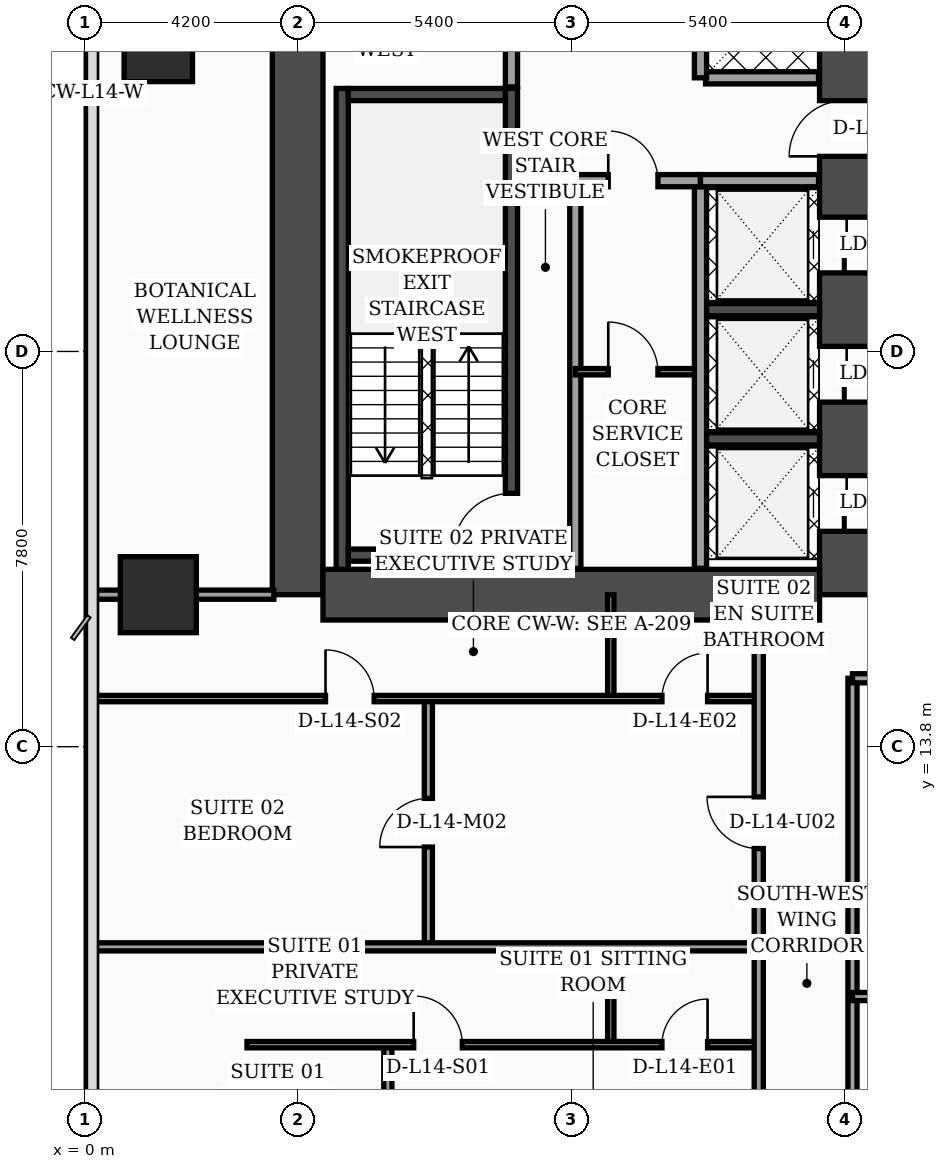
"""IFC4 building model, lengths in metres.
Left out: names, types, materials, properties, quantities, classifications, styles, units other than length and angle.
Written with IfcOpenShell. Run it as: python <this file> out.ifc"""

import sys

from ifc_helpers import new_model, si_unit, direction, frame, frame_2d, origin, origin_2d, place, context, subcontext, project, spatial, rectangle, extrude, element, fill, save


model = new_model("IFC4")
c1 = context("Model", 3, precision=1e-05, world=origin(), true_north=direction((0.0, 1.0)))
c2 = subcontext(c1, "Body", "Model", "MODEL_VIEW")
j1 = project(units=[si_unit("LENGTHUNIT", "METRE"), si_unit("PLANEANGLEUNIT", "RADIAN")], contexts=[c1])
p1 = place(None, origin())
s1 = spatial("IfcSite", under=j1, at=p1, CompositionType="ELEMENT")
p2 = place(p1, origin())
s2 = spatial("IfcBuilding", under=s1, at=p2, CompositionType="ELEMENT")
p3 = place(p2, frame((0.0, 0.0, 62.2)))
s3 = spatial("IfcBuildingStorey", under=s2, at=p3, CompositionType="ELEMENT", Elevation=62.2)
p4 = place(p3, frame((4.2, 16.8, 0.0), z_axis=(0.0, 0.0, 1.0), x_axis=(0.0, 1.0, 0.0)))
e1 = element("IfcWall", 1, at=p4, inside=s3, PredefinedType="SHEAR", context=c2, shape_type="SweptSolid", body=[
    extrude(rectangle(XDim=21.6, YDim=1.0, at=frame_2d((10.8, 0.0))), origin(), (0.0, 0.0, 1.0), 3.56),
])
p5 = place(p3, frame((15.0, 16.8, 0.0), z_axis=(0.0, 0.0, 1.0), x_axis=(0.0, 1.0, 0.0)))
e2 = element("IfcWall", 2, at=p5, inside=s3, PredefinedType="SHEAR", context=c2, shape_type="SweptSolid", body=[
    extrude(rectangle(XDim=21.6, YDim=1.0, at=frame_2d((10.8, 0.0))), origin(), (0.0, 0.0, 1.0), 3.56),
])
p6 = place(p5, frame((8.65, 0.0, 0.0)))
e3 = element("IfcOpeningElement", 3, at=p6, cuts=e2, PredefinedType="OPENING", context=c2, shape_type="SweptSolid", body=[
    extrude(rectangle(XDim=1.1, YDim=2.2, at=frame_2d((0.55, 1.1))), frame((0.0, 0.51, 0.0), z_axis=(0.0, -1.0, 0.0), x_axis=(1.0, 0.0, 0.0)), (0.0, 0.0, 1.0), 1.02),
])
p7 = place(p5, frame((1.25, 0.0, 0.0)))
e4 = element("IfcOpeningElement", 4, at=p7, cuts=e2, PredefinedType="OPENING", context=c2, shape_type="SweptSolid", body=[
    extrude(rectangle(XDim=1.1, YDim=2.2, at=frame_2d((0.55, 1.1))), frame((0.0, 0.51, 0.0), z_axis=(0.0, -1.0, 0.0), x_axis=(1.0, 0.0, 0.0)), (0.0, 0.0, 1.0), 1.02),
])
p8 = place(p5, frame((3.8, 0.0, 0.0)))
e5 = element("IfcOpeningElement", 5, at=p8, cuts=e2, PredefinedType="OPENING", context=c2, shape_type="SweptSolid", body=[
    extrude(rectangle(XDim=1.1, YDim=2.2, at=frame_2d((0.55, 1.1))), frame((0.0, 0.51, 0.0), z_axis=(0.0, -1.0, 0.0), x_axis=(1.0, 0.0, 0.0)), (0.0, 0.0, 1.0), 1.02),
])
p9 = place(p5, frame((6.35, 0.0, 0.0)))
e6 = element("IfcOpeningElement", 6, at=p9, cuts=e2, PredefinedType="OPENING", context=c2, shape_type="SweptSolid", body=[
    extrude(rectangle(XDim=1.1, YDim=2.2, at=frame_2d((0.55, 1.1))), frame((0.0, 0.51, 0.0), z_axis=(0.0, -1.0, 0.0), x_axis=(1.0, 0.0, 0.0)), (0.0, 0.0, 1.0), 1.02),
])
p10 = place(p3, frame((4.7, 16.8, 0.0), z_axis=(0.0, 0.0, 1.0), x_axis=(1.0, 0.0, 0.0)))
e7 = element("IfcWall", 7, at=p10, inside=s3, PredefinedType="SHEAR", context=c2, shape_type="SweptSolid", body=[
    extrude(rectangle(XDim=9.8, YDim=1.0, at=frame_2d((4.9, 0.0))), origin(), (0.0, 0.0, 1.0), 3.56),
])
p11 = place(p3, frame((5.08, 17.3, 0.0), z_axis=(0.0, 0.0, 1.0), x_axis=(0.0, 1.0, 0.0)))
e8 = element("IfcWall", 8, at=p11, inside=s3, PredefinedType="SOLIDWALL", context=c2, shape_type="SweptSolid", body=[
    extrude(rectangle(XDim=9.49, YDim=0.24, at=frame_2d((4.745, 0.0))), origin(), (0.0, 0.0, 1.0), 3.56),
])
p12 = place(p3, frame((8.42, 17.3, 0.0), z_axis=(0.0, 0.0, 1.0), x_axis=(0.0, 1.0, 0.0)))
e9 = element("IfcWall", 9, at=p12, inside=s3, PredefinedType="SOLIDWALL", context=c2, shape_type="SweptSolid", body=[
    extrude(rectangle(XDim=9.49, YDim=0.24, at=frame_2d((4.745, 0.0))), origin(), (0.0, 0.0, 1.0), 3.56),
])
p13 = place(p12, frame((0.35, 0.0, 0.0)))
e10 = element("IfcOpeningElement", 10, at=p13, cuts=e9, PredefinedType="OPENING", context=c2, shape_type="SweptSolid", body=[
    extrude(rectangle(XDim=1.15, YDim=2.2, at=frame_2d((0.575, 1.1))), frame((0.0, 0.13, 0.0), z_axis=(0.0, -1.0, 0.0), x_axis=(1.0, 0.0, 0.0)), (0.0, 0.0, 1.0), 0.26),
])
for number, where, z_axis, x_axis in (
    (11, (5.2, 17.58, 0.0), (0.0, 0.0, 1.0), (1.0, 0.0, 0.0)),
    (12, (5.2, 26.67, 0.0), (0.0, 0.0, 1.0), (1.0, 0.0, 0.0)),
):
    element("IfcWall", number, at=place(p3, frame(where, z_axis=z_axis, x_axis=x_axis)), inside=s3, PredefinedType="SOLIDWALL", context=c2, shape_type="SweptSolid", body=[
        extrude(rectangle(XDim=3.1, YDim=0.24, at=frame_2d((1.55, 0.0))), origin(), (0.0, 0.0, 1.0), 3.56),
    ])
for number, where, z_axis, x_axis in (
    (13, (12.18, 19.875, 0.0), (0.0, 0.0, 1.0), (1.0, 0.0, 0.0)),
    (14, (12.18, 22.425, 0.0), (0.0, 0.0, 1.0), (1.0, 0.0, 0.0)),
):
    element("IfcWall", number, at=place(p3, frame(where, z_axis=z_axis, x_axis=x_axis)), inside=s3, PredefinedType="SOLIDWALL", context=c2, shape_type="SweptSolid", body=[
        extrude(rectangle(XDim=2.32, YDim=0.24, at=frame_2d((1.16, 0.0))), origin(), (0.0, 0.0, 1.0), 3.56),
    ])
p14 = place(p3, frame((1.45, 16.8, 0.0), z_axis=(0.0, 0.0, 1.0), x_axis=(1.0, 0.0, 0.0)))
e15 = element("IfcColumn", 15, at=p14, inside=s3, PredefinedType="COLUMN", context=c2, shape_type="SweptSolid", body=[
    extrude(rectangle(XDim=1.5, YDim=1.5, at=origin_2d()), origin(), (0.0, 0.0, 1.0), 3.56),
])
p15 = place(p3, frame((1.45, 27.6, 0.0), z_axis=(0.0, 0.0, 1.0), x_axis=(1.0, 0.0, 0.0)))
e16 = element("IfcColumn", 16, at=p15, inside=s3, PredefinedType="COLUMN", context=c2, shape_type="SweptSolid", body=[
    extrude(rectangle(XDim=1.35, YDim=1.35, at=origin_2d()), origin(), (0.0, 0.0, 1.0), 3.56),
])
p16 = place(p3, frame((8.42, 26.82, 0.0), z_axis=(0.0, 0.0, 1.0), x_axis=(0.0, 1.0, 0.0)))
e17 = element("IfcWall", 17, at=p16, inside=s3, PredefinedType="SOLIDWALL", context=c2, shape_type="SweptSolid", body=[
    extrude(rectangle(XDim=3.0, YDim=0.24, at=frame_2d((1.5, 0.0))), origin(), (0.0, 0.0, 1.0), 3.56),
])
p17 = place(p16, frame((0.9, 0.0, 0.0)))
e18 = element("IfcOpeningElement", 18, at=p17, cuts=e17, PredefinedType="OPENING", context=c2, shape_type="SweptSolid", body=[
    extrude(rectangle(XDim=1.1, YDim=2.2, at=frame_2d((0.55, 1.1))), frame((0.0, 0.13, 0.0), z_axis=(0.0, -1.0, 0.0), x_axis=(1.0, 0.0, 0.0)), (0.0, 0.0, 1.0), 0.26),
])
p18 = place(p3, frame((9.68, 17.32, 0.0), z_axis=(0.0, 0.0, 1.0), x_axis=(0.0, 1.0, 0.0)))
e19 = element("IfcWall", 19, at=p18, inside=s3, PredefinedType="SOLIDWALL", context=c2, shape_type="SweptSolid", body=[
    extrude(rectangle(XDim=7.68, YDim=0.22, at=frame_2d((3.84, 0.0))), origin(), (0.0, 0.0, 1.0), 3.56),
])
p19 = place(p3, frame((9.68, 21.2, 0.0), z_axis=(0.0, 0.0, 1.0), x_axis=(1.0, 0.0, 0.0)))
e20 = element("IfcWall", 20, at=p19, inside=s3, PredefinedType="PARTITIONING", context=c2, shape_type="SweptSolid", body=[
    extrude(rectangle(XDim=2.47, YDim=0.125, at=frame_2d((1.235, 0.0))), origin(), (0.0, 0.0, 1.0), 3.56),
])
p20 = place(p19, frame((0.65, 0.0, 0.0)))
e21 = element("IfcOpeningElement", 21, at=p20, cuts=e20, PredefinedType="OPENING", context=c2, shape_type="SweptSolid", body=[
    extrude(rectangle(XDim=0.98, YDim=2.15, at=frame_2d((0.49, 1.075))), frame((0.0, 0.073, 0.0), z_axis=(0.0, -1.0, 0.0), x_axis=(1.0, 0.0, 0.0)), (0.0, 0.0, 1.0), 0.145),
])
p21 = place(p3, frame((12.15, 17.32, 0.0), z_axis=(0.0, 0.0, 1.0), x_axis=(0.0, 1.0, 0.0)))
e22 = element("IfcWall", 22, at=p21, inside=s3, PredefinedType="SOLIDWALL", context=c2, shape_type="SweptSolid", body=[
    extrude(rectangle(XDim=7.65, YDim=0.24, at=frame_2d((3.825, 0.0))), origin(), (0.0, 0.0, 1.0), 3.56),
])
p22 = place(p3, frame((9.68, 24.97, 0.0), z_axis=(0.0, 0.0, 1.0), x_axis=(1.0, 0.0, 0.0)))
e23 = element("IfcWall", 23, at=p22, inside=s3, PredefinedType="SOLIDWALL", context=c2, shape_type="SweptSolid", body=[
    extrude(rectangle(XDim=2.47, YDim=0.24, at=frame_2d((1.235, 0.0))), origin(), (0.0, 0.0, 1.0), 3.56),
])
p23 = place(p22, frame((0.65, 0.0, 0.0)))
e24 = element("IfcOpeningElement", 24, at=p23, cuts=e23, PredefinedType="OPENING", context=c2, shape_type="SweptSolid", body=[
    extrude(rectangle(XDim=0.98, YDim=2.15, at=frame_2d((0.49, 1.075))), frame((0.0, 0.13, 0.0), z_axis=(0.0, -1.0, 0.0), x_axis=(1.0, 0.0, 0.0)), (0.0, 0.0, 1.0), 0.26),
])
p24 = place(p3, frame((12.15, 24.97, 0.0), z_axis=(0.0, 0.0, 1.0), x_axis=(1.0, 0.0, 0.0)))
e25 = element("IfcWall", 25, at=p24, inside=s3, PredefinedType="SOLIDWALL", context=c2, shape_type="SweptSolid", body=[
    extrude(rectangle(XDim=2.33, YDim=0.24, at=frame_2d((1.165, 0.0))), origin(), (0.0, 0.0, 1.0), 2.84),
])
p25 = place(p3, frame((12.25, 27.0, 0.0), z_axis=(0.0, 0.0, 1.0), x_axis=(1.0, 0.0, 0.0)))
e26 = element("IfcWall", 26, at=p25, inside=s3, PredefinedType="SOLIDWALL", context=c2, shape_type="SweptSolid", body=[
    extrude(rectangle(XDim=2.23, YDim=0.24, at=frame_2d((1.115, 0.0))), origin(), (0.0, 0.0, 1.0), 3.56),
])
p26 = place(p3, frame((12.15, 27.0, 0.0), z_axis=(0.0, 0.0, 1.0), x_axis=(0.0, 1.0, 0.0)))
e27 = element("IfcWall", 27, at=p26, inside=s3, PredefinedType="SOLIDWALL", context=c2, shape_type="SweptSolid", body=[
    extrude(rectangle(XDim=7.75, YDim=0.24, at=frame_2d((3.875, 0.0))), origin(), (0.0, 0.0, 1.0), 3.56),
])
p27 = place(p3, frame((0.08, 16.8, 0.0), z_axis=(0.0, 0.0, 1.0), x_axis=(1.0, 0.0, 0.0)))
e28 = element("IfcWall", 28, at=p27, inside=s3, PredefinedType="PARTITIONING", context=c2, shape_type="SweptSolid", body=[
    extrude(rectangle(XDim=3.65, YDim=0.18, at=frame_2d((1.825, 0.0))), origin(), (0.0, 0.0, 1.0), 2.84),
])
p28 = place(p3, frame((10.38, 7.92, 0.0), z_axis=(0.0, 0.0, 1.0), x_axis=(0.0, 1.0, 0.0)))
e29 = element("IfcWall", 29, at=p28, inside=s3, PredefinedType="PARTITIONING", context=c2, shape_type="SweptSolid", body=[
    extrude(rectangle(XDim=1.93, YDim=0.125, at=frame_2d((0.965, 0.0))), origin(), (0.0, 0.0, 1.0), 3.56),
])
p29 = place(p3, frame((5.98, 2.44, 0.0), z_axis=(0.0, 0.0, 1.0), x_axis=(0.0, 1.0, 0.0)))
e30 = element("IfcWall", 30, at=p29, inside=s3, PredefinedType="PARTITIONING", context=c2, shape_type="SweptSolid", body=[
    extrude(rectangle(XDim=5.48, YDim=0.16, at=frame_2d((2.74, 0.0))), origin(), (0.0, 0.0, 1.0), 3.04),
])
p30 = place(p29, frame((2.26, 0.0, 0.0)))
e31 = element("IfcOpeningElement", 31, at=p30, cuts=e30, PredefinedType="OPENING", context=c2, shape_type="SweptSolid", body=[
    extrude(rectangle(XDim=0.96, YDim=2.2, at=frame_2d((0.48, 1.1))), frame((0.0, 0.09, 0.0), z_axis=(0.0, -1.0, 0.0), x_axis=(1.0, 0.0, 0.0)), (0.0, 0.0, 1.0), 0.18),
])
p31 = place(p3, frame((3.2, 7.92, 0.0), z_axis=(0.0, 0.0, 1.0), x_axis=(1.0, 0.0, 0.0)))
e32 = element("IfcWall", 32, at=p31, inside=s3, PredefinedType="PARTITIONING", context=c2, shape_type="SweptSolid", body=[
    extrude(rectangle(XDim=10.1, YDim=0.125, at=frame_2d((5.05, 0.0))), origin(), (0.0, 0.0, 1.0), 2.84),
])
p32 = place(p31, frame((3.29, 0.0, 0.0)))
e33 = element("IfcOpeningElement", 33, at=p32, cuts=e32, PredefinedType="OPENING", context=c2, shape_type="SweptSolid", body=[
    extrude(rectangle(XDim=0.96, YDim=2.2, at=frame_2d((0.48, 1.1))), frame((0.0, 0.073, 0.0), z_axis=(0.0, -1.0, 0.0), x_axis=(1.0, 0.0, 0.0)), (0.0, 0.0, 1.0), 0.145),
])
p33 = place(p31, frame((8.19, 0.0, 0.0)))
e34 = element("IfcOpeningElement", 34, at=p33, cuts=e32, PredefinedType="OPENING", context=c2, shape_type="SweptSolid", body=[
    extrude(rectangle(XDim=0.9, YDim=2.15, at=frame_2d((0.45, 1.075))), frame((0.0, 0.073, 0.0), z_axis=(0.0, -1.0, 0.0), x_axis=(1.0, 0.0, 0.0)), (0.0, 0.0, 1.0), 0.145),
])
p34 = place(p3, frame((10.38, 14.75, 0.0), z_axis=(0.0, 0.0, 1.0), x_axis=(0.0, 1.0, 0.0)))
e35 = element("IfcWall", 35, at=p34, inside=s3, PredefinedType="PARTITIONING", context=c2, shape_type="SweptSolid", body=[
    extrude(rectangle(XDim=2.05, YDim=0.125, at=frame_2d((1.025, 0.0))), origin(), (0.0, 0.0, 1.0), 3.56),
])
p35 = place(p3, frame((6.78, 9.85, 0.0), z_axis=(0.0, 0.0, 1.0), x_axis=(0.0, 1.0, 0.0)))
e36 = element("IfcWall", 36, at=p35, inside=s3, PredefinedType="PARTITIONING", context=c2, shape_type="SweptSolid", body=[
    extrude(rectangle(XDim=4.9, YDim=0.16, at=frame_2d((2.45, 0.0))), origin(), (0.0, 0.0, 1.0), 3.14),
])
p36 = place(p35, frame((1.97, 0.0, 0.0)))
e37 = element("IfcOpeningElement", 37, at=p36, cuts=e36, PredefinedType="OPENING", context=c2, shape_type="SweptSolid", body=[
    extrude(rectangle(XDim=0.96, YDim=2.2, at=frame_2d((0.48, 1.1))), frame((0.0, 0.09, 0.0), z_axis=(0.0, -1.0, 0.0), x_axis=(1.0, 0.0, 0.0)), (0.0, 0.0, 1.0), 0.18),
])
p37 = place(p3, frame((0.08, 14.75, 0.0), z_axis=(0.0, 0.0, 1.0), x_axis=(1.0, 0.0, 0.0)))
e38 = element("IfcWall", 38, at=p37, inside=s3, PredefinedType="PARTITIONING", context=c2, shape_type="SweptSolid", body=[
    extrude(rectangle(XDim=13.22, YDim=0.125, at=frame_2d((6.61, 0.0))), origin(), (0.0, 0.0, 1.0), 2.84),
])
p38 = place(p37, frame((4.67, 0.0, 0.0)))
e39 = element("IfcOpeningElement", 39, at=p38, cuts=e38, PredefinedType="OPENING", context=c2, shape_type="SweptSolid", body=[
    extrude(rectangle(XDim=0.96, YDim=2.2, at=frame_2d((0.48, 1.1))), frame((0.0, 0.073, 0.0), z_axis=(0.0, -1.0, 0.0), x_axis=(1.0, 0.0, 0.0)), (0.0, 0.0, 1.0), 0.145),
])
p39 = place(p37, frame((11.31, 0.0, 0.0)))
e40 = element("IfcOpeningElement", 40, at=p39, cuts=e38, PredefinedType="OPENING", context=c2, shape_type="SweptSolid", body=[
    extrude(rectangle(XDim=0.9, YDim=2.15, at=frame_2d((0.45, 1.075))), frame((0.0, 0.073, 0.0), z_axis=(0.0, -1.0, 0.0), x_axis=(1.0, 0.0, 0.0)), (0.0, 0.0, 1.0), 0.145),
])
p40 = place(p3, frame((0.08, 9.85, 0.0), z_axis=(0.0, 0.0, 1.0), x_axis=(1.0, 0.0, 0.0)))
e41 = element("IfcWall", 41, at=p40, inside=s3, PredefinedType="PARTITIONING", context=c2, shape_type="SweptSolid", body=[
    extrude(rectangle(XDim=13.22, YDim=0.16, at=frame_2d((6.61, 0.0))), origin(), (0.0, 0.0, 1.0), 2.84),
])
p41 = place(p3, frame((13.3, 2.44, 0.0), z_axis=(0.0, 0.0, 1.0), x_axis=(0.0, 1.0, 0.0)))
e42 = element("IfcWall", 42, at=p41, inside=s3, PredefinedType="PARTITIONING", context=c2, shape_type="SweptSolid", body=[
    extrude(rectangle(XDim=14.36, YDim=0.18, at=frame_2d((7.18, 0.0))), origin(), (0.0, 0.0, 1.0), 3.04),
])
p42 = place(p41, frame((3.01, 0.0, 0.0)))
e43 = element("IfcOpeningElement", 43, at=p42, cuts=e42, PredefinedType="OPENING", context=c2, shape_type="SweptSolid", body=[
    extrude(rectangle(XDim=1.02, YDim=2.2, at=frame_2d((0.51, 1.1))), frame((0.0, 0.1, 0.0), z_axis=(0.0, -1.0, 0.0), x_axis=(1.0, 0.0, 0.0)), (0.0, 0.0, 1.0), 0.2),
])
p43 = place(p41, frame((9.35, 0.0, 0.0)))
e44 = element("IfcOpeningElement", 44, at=p43, cuts=e42, PredefinedType="OPENING", context=c2, shape_type="SweptSolid", body=[
    extrude(rectangle(XDim=1.02, YDim=2.2, at=frame_2d((0.51, 1.1))), frame((0.0, 0.1, 0.0), z_axis=(0.0, -1.0, 0.0), x_axis=(1.0, 0.0, 0.0)), (0.0, 0.0, 1.0), 0.2),
])
p44 = place(p3, frame((15.15, 2.44, 0.0), z_axis=(0.0, 0.0, 1.0), x_axis=(0.0, 1.0, 0.0)))
e45 = element("IfcWall", 45, at=p44, inside=s3, PredefinedType="PARTITIONING", context=c2, shape_type="SweptSolid", body=[
    extrude(rectangle(XDim=12.71, YDim=0.18, at=frame_2d((6.355, 0.0))), origin(), (0.0, 0.0, 1.0), 3.04),
])
p45 = place(p3, frame((15.15, 8.87, 0.0), z_axis=(0.0, 0.0, 1.0), x_axis=(1.0, 0.0, 0.0)))
e46 = element("IfcWall", 46, at=p45, inside=s3, PredefinedType="PARTITIONING", context=c2, shape_type="SweptSolid", body=[
    extrude(rectangle(XDim=4.45, YDim=0.16, at=frame_2d((2.225, 0.0))), origin(), (0.0, 0.0, 1.0), 3.56),
])
p46 = place(p45, frame((1.75, 0.0, 0.0)))
e47 = element("IfcOpeningElement", 47, at=p46, cuts=e46, PredefinedType="OPENING", context=c2, shape_type="SweptSolid", body=[
    extrude(rectangle(XDim=0.96, YDim=2.2, at=frame_2d((0.48, 1.1))), frame((0.0, 0.09, 0.0), z_axis=(0.0, -1.0, 0.0), x_axis=(1.0, 0.0, 0.0)), (0.0, 0.0, 1.0), 0.18),
])
p47 = place(p3, frame((15.15, 15.15, 0.0), z_axis=(0.0, 0.0, 1.0), x_axis=(1.0, 0.0, 0.0)))
e48 = element("IfcWall", 48, at=p47, inside=s3, PredefinedType="PARTITIONING", context=c2, shape_type="SweptSolid", body=[
    extrude(rectangle(XDim=6.45, YDim=0.18, at=frame_2d((3.225, 0.0))), origin(), (0.0, 0.0, 1.0), 2.34),
])
p48 = place(p47, frame((1.74, 0.0, 0.0)))
e49 = element("IfcOpeningElement", 49, at=p48, cuts=e48, PredefinedType="OPENING", context=c2, shape_type="SweptSolid", body=[
    extrude(rectangle(XDim=1.02, YDim=2.2, at=frame_2d((0.51, 1.1))), frame((0.0, 0.1, 0.0), z_axis=(0.0, -1.0, 0.0), x_axis=(1.0, 0.0, 0.0)), (0.0, 0.0, 1.0), 0.2),
])
p49 = place(p20, origin())
e50 = element("IfcDoor", 50, at=p49, inside=s3, OperationType="SINGLE_SWING_LEFT", PredefinedType="DOOR", context=c2, shape_type="SweptSolid", body=[
    extrude(rectangle(XDim=0.98, YDim=2.15, at=frame_2d((0.49, 1.075))), frame((0.0, 0.025, 0.0), z_axis=(0.0, -1.0, 0.0), x_axis=(1.0, 0.0, 0.0)), (0.0, 0.0, 1.0), 0.05),
])
fill(e21, e50)
p50 = place(p23, origin())
e51 = element("IfcDoor", 51, at=p50, inside=s3, OperationType="SINGLE_SWING_LEFT", PredefinedType="DOOR", context=c2, shape_type="SweptSolid", body=[
    extrude(rectangle(XDim=0.98, YDim=2.15, at=frame_2d((0.49, 1.075))), frame((0.0, 0.025, 0.0), z_axis=(0.0, -1.0, 0.0), x_axis=(1.0, 0.0, 0.0)), (0.0, 0.0, 1.0), 0.05),
])
fill(e24, e51)
p51 = place(p32, origin())
e52 = element("IfcDoor", 52, at=p51, inside=s3, OperationType="SINGLE_SWING_LEFT", PredefinedType="DOOR", context=c2, shape_type="SweptSolid", body=[
    extrude(rectangle(XDim=0.96, YDim=2.2, at=frame_2d((0.48, 1.1))), frame((0.0, 0.025, 0.0), z_axis=(0.0, -1.0, 0.0), x_axis=(1.0, 0.0, 0.0)), (0.0, 0.0, 1.0), 0.05),
])
fill(e33, e52)
p52 = place(p33, origin())
e53 = element("IfcDoor", 53, at=p52, inside=s3, OperationType="SINGLE_SWING_RIGHT", PredefinedType="DOOR", context=c2, shape_type="SweptSolid", body=[
    extrude(rectangle(XDim=0.9, YDim=2.15, at=frame_2d((0.45, 1.075))), frame((0.0, 0.025, 0.0), z_axis=(0.0, -1.0, 0.0), x_axis=(1.0, 0.0, 0.0)), (0.0, 0.0, 1.0), 0.05),
])
fill(e34, e53)
p53 = place(p36, origin())
e54 = element("IfcDoor", 54, at=p53, inside=s3, OperationType="SINGLE_SWING_LEFT", PredefinedType="DOOR", context=c2, shape_type="SweptSolid", body=[
    extrude(rectangle(XDim=0.96, YDim=2.2, at=frame_2d((0.48, 1.1))), frame((0.0, 0.025, 0.0), z_axis=(0.0, -1.0, 0.0), x_axis=(1.0, 0.0, 0.0)), (0.0, 0.0, 1.0), 0.05),
])
fill(e37, e54)
p54 = place(p38, origin())
e55 = element("IfcDoor", 55, at=p54, inside=s3, OperationType="SINGLE_SWING_LEFT", PredefinedType="DOOR", context=c2, shape_type="SweptSolid", body=[
    extrude(rectangle(XDim=0.96, YDim=2.2, at=frame_2d((0.48, 1.1))), frame((0.0, 0.025, 0.0), z_axis=(0.0, -1.0, 0.0), x_axis=(1.0, 0.0, 0.0)), (0.0, 0.0, 1.0), 0.05),
])
fill(e39, e55)
p55 = place(p39, origin())
e56 = element("IfcDoor", 56, at=p55, inside=s3, OperationType="SINGLE_SWING_RIGHT", PredefinedType="DOOR", context=c2, shape_type="SweptSolid", body=[
    extrude(rectangle(XDim=0.9, YDim=2.15, at=frame_2d((0.45, 1.075))), frame((0.0, 0.025, 0.0), z_axis=(0.0, -1.0, 0.0), x_axis=(1.0, 0.0, 0.0)), (0.0, 0.0, 1.0), 0.05),
])
fill(e40, e56)
p56 = place(p43, origin())
e57 = element("IfcDoor", 57, at=p56, inside=s3, OperationType="SINGLE_SWING_RIGHT", PredefinedType="DOOR", context=c2, shape_type="SweptSolid", body=[
    extrude(rectangle(XDim=1.02, YDim=2.2, at=frame_2d((0.51, 1.1))), frame((0.0, 0.025, 0.0), z_axis=(0.0, -1.0, 0.0), x_axis=(1.0, 0.0, 0.0)), (0.0, 0.0, 1.0), 0.05),
])
fill(e44, e57)
p57 = place(p13, origin())
e58 = element("IfcDoor", 58, at=p57, inside=s3, OperationType="SINGLE_SWING_LEFT", PredefinedType="DOOR", context=c2, shape_type="SweptSolid", body=[
    extrude(rectangle(XDim=1.15, YDim=2.2, at=frame_2d((0.575, 1.1))), frame((0.0, 0.025, 0.0), z_axis=(0.0, -1.0, 0.0), x_axis=(1.0, 0.0, 0.0)), (0.0, 0.0, 1.0), 0.05),
])
fill(e10, e58)
p58 = place(p6, origin())
e59 = element("IfcDoor", 59, at=p58, inside=s3, OperationType="SINGLE_SWING_LEFT", PredefinedType="DOOR", context=c2, shape_type="SweptSolid", body=[
    extrude(rectangle(XDim=1.1, YDim=2.2, at=frame_2d((0.55, 1.1))), frame((0.0, 0.025, 0.0), z_axis=(0.0, -1.0, 0.0), x_axis=(1.0, 0.0, 0.0)), (0.0, 0.0, 1.0), 0.05),
])
fill(e3, e59)
p59 = place(p7, origin())
e60 = element("IfcDoor", 60, at=p59, inside=s3, OperationType="DOUBLE_DOOR_SLIDING", PredefinedType="DOOR", context=c2, shape_type="SweptSolid", body=[
    extrude(rectangle(XDim=1.1, YDim=2.2, at=frame_2d((0.55, 1.1))), frame((0.0, 0.025, 0.0), z_axis=(0.0, -1.0, 0.0), x_axis=(1.0, 0.0, 0.0)), (0.0, 0.0, 1.0), 0.05),
])
fill(e4, e60)
p60 = place(p8, origin())
e61 = element("IfcDoor", 61, at=p60, inside=s3, OperationType="DOUBLE_DOOR_SLIDING", PredefinedType="DOOR", context=c2, shape_type="SweptSolid", body=[
    extrude(rectangle(XDim=1.1, YDim=2.2, at=frame_2d((0.55, 1.1))), frame((0.0, 0.025, 0.0), z_axis=(0.0, -1.0, 0.0), x_axis=(1.0, 0.0, 0.0)), (0.0, 0.0, 1.0), 0.05),
])
fill(e5, e61)
p61 = place(p9, origin())
e62 = element("IfcDoor", 62, at=p61, inside=s3, OperationType="DOUBLE_DOOR_SLIDING", PredefinedType="DOOR", context=c2, shape_type="SweptSolid", body=[
    extrude(rectangle(XDim=1.1, YDim=2.2, at=frame_2d((0.55, 1.1))), frame((0.0, 0.025, 0.0), z_axis=(0.0, -1.0, 0.0), x_axis=(1.0, 0.0, 0.0)), (0.0, 0.0, 1.0), 0.05),
])
fill(e6, e62)
save(model, sys.argv[1])
